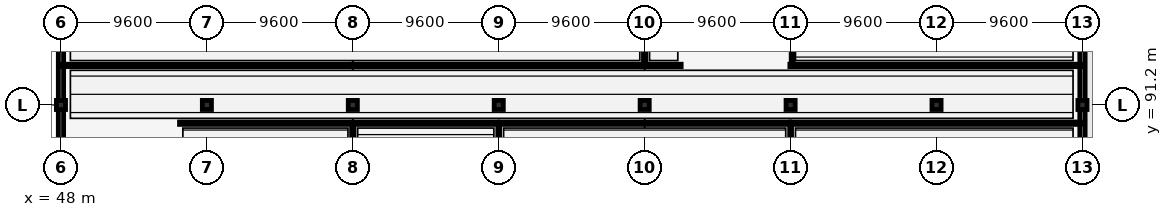
"""IFC4 building model, lengths in metres.
Left out: names, types, materials, properties, quantities, classifications, styles, units other than length and angle.
Written with IfcOpenShell. Run it as: python <this file> out.ifc"""

import sys

from ifc_helpers import new_model, si_unit, direction, frame, frame_2d, origin, origin_2d, place, context, subcontext, project, spatial, rectangle, extrude, element, fill, save


model = new_model("IFC4")
c1 = context("Model", 3, precision=1e-05, world=origin(), true_north=direction((0.0, 1.0)))
c2 = subcontext(c1, "Body", "Model", "MODEL_VIEW")
j1 = project(units=[si_unit("LENGTHUNIT", "METRE"), si_unit("PLANEANGLEUNIT", "RADIAN")], contexts=[c1])
p1 = place(None, origin())
s1 = spatial("IfcSite", under=j1, at=p1, CompositionType="ELEMENT")
p2 = place(p1, origin())
s2 = spatial("IfcBuilding", under=s1, at=p2, CompositionType="ELEMENT")
p3 = place(p2, origin())
s3 = spatial("IfcBuildingStorey", under=s2, at=p3, CompositionType="ELEMENT", Elevation=0.0)
for number, where, z_axis, x_axis in (
    (1, (48.0, 91.2, 0.0), (0.0, 0.0, 1.0), (1.0, 0.0, 0.0)),
    (2, (57.6, 91.2, 0.0), (0.0, 0.0, 1.0), (1.0, 0.0, 0.0)),
    (3, (67.2, 91.2, 0.0), (0.0, 0.0, 1.0), (1.0, 0.0, 0.0)),
    (4, (76.8, 91.2, 0.0), (0.0, 0.0, 1.0), (1.0, 0.0, 0.0)),
    (5, (86.4, 91.2, 0.0), (0.0, 0.0, 1.0), (1.0, 0.0, 0.0)),
    (6, (96.0, 91.2, 0.0), (0.0, 0.0, 1.0), (1.0, 0.0, 0.0)),
    (7, (105.6, 91.2, 0.0), (0.0, 0.0, 1.0), (1.0, 0.0, 0.0)),
    (8, (115.2, 91.2, 0.0), (0.0, 0.0, 1.0), (1.0, 0.0, 0.0)),
):
    element("IfcColumn", number, at=place(p3, frame(where, z_axis=z_axis, x_axis=x_axis)), inside=s3, PredefinedType="COLUMN", context=c2, shape_type="SweptSolid", body=[
        extrude(rectangle(XDim=0.6, YDim=0.6, at=origin_2d()), origin(), (0.0, 0.0, 1.0), 4.8),
    ])
p4 = place(p3, frame((48.0, 81.9, 0.0), z_axis=(0.0, 0.0, 1.0), x_axis=(0.0, 1.0, 0.0)))
e9 = element("IfcWall", 9, at=p4, inside=s3, PredefinedType="SOLIDWALL", context=c2, shape_type="SweptSolid", body=[
    extrude(rectangle(XDim=9.0, YDim=0.35, at=frame_2d((4.5, 0.0))), origin(), (0.0, 0.0, 1.0), 4.1),
])
p5 = place(p4, frame((2.8, 0.0, 1.15)))
e10 = element("IfcOpeningElement", 10, at=p5, cuts=e9, PredefinedType="OPENING", context=c2, shape_type="SweptSolid", body=[
    extrude(rectangle(XDim=1.38, YDim=1.51, at=frame_2d((0.69, 0.755))), frame((0.0, 0.185, 0.0), z_axis=(0.0, -1.0, 0.0), x_axis=(1.0, 0.0, 0.0)), (0.0, 0.0, 1.0), 0.37),
])
p6 = place(p3, frame((115.2, 81.9, 0.0), z_axis=(0.0, 0.0, 1.0), x_axis=(0.0, 1.0, 0.0)))
e11 = element("IfcWall", 11, at=p6, inside=s3, PredefinedType="SOLIDWALL", context=c2, shape_type="SweptSolid", body=[
    extrude(rectangle(XDim=9.0, YDim=0.35, at=frame_2d((4.5, 0.0))), origin(), (0.0, 0.0, 1.0), 4.1),
])
p7 = place(p6, frame((2.8, 0.0, 1.15)))
e12 = element("IfcOpeningElement", 12, at=p7, cuts=e11, PredefinedType="OPENING", context=c2, shape_type="SweptSolid", body=[
    extrude(rectangle(XDim=1.5, YDim=1.6, at=frame_2d((0.75, 0.8))), frame((0.0, 0.185, 0.0), z_axis=(0.0, -1.0, 0.0), x_axis=(1.0, 0.0, 0.0)), (0.0, 0.0, 1.0), 0.37),
])
p8 = place(p3, frame((48.0, 91.5, 0.0), z_axis=(0.0, 0.0, 1.0), x_axis=(0.0, 1.0, 0.0)))
e13 = element("IfcWall", 13, at=p8, inside=s3, PredefinedType="SOLIDWALL", context=c2, shape_type="SweptSolid", body=[
    extrude(rectangle(XDim=9.0, YDim=0.35, at=frame_2d((4.5, 0.0))), origin(), (0.0, 0.0, 1.0), 4.1),
])
p9 = place(p8, frame((4.3, 0.0, 0.0)))
e14 = element("IfcOpeningElement", 14, at=p9, cuts=e13, PredefinedType="OPENING", context=c2, shape_type="SweptSolid", body=[
    extrude(rectangle(XDim=1.76, YDim=2.37, at=frame_2d((0.88, 1.185))), frame((0.0, 0.185, 0.0), z_axis=(0.0, -1.0, 0.0), x_axis=(1.0, 0.0, 0.0)), (0.0, 0.0, 1.0), 0.37),
])
p10 = place(p3, frame((115.2, 91.5, 0.0), z_axis=(0.0, 0.0, 1.0), x_axis=(0.0, 1.0, 0.0)))
e15 = element("IfcWall", 15, at=p10, inside=s3, PredefinedType="SOLIDWALL", context=c2, shape_type="SweptSolid", body=[
    extrude(rectangle(XDim=9.0, YDim=0.35, at=frame_2d((4.5, 0.0))), origin(), (0.0, 0.0, 1.0), 4.1),
])
p11 = place(p10, frame((4.3, 0.0, 0.0)))
e16 = element("IfcOpeningElement", 16, at=p11, cuts=e15, PredefinedType="OPENING", context=c2, shape_type="SweptSolid", body=[
    extrude(rectangle(XDim=1.72, YDim=2.34, at=frame_2d((0.86, 1.17))), frame((0.0, 0.185, 0.0), z_axis=(0.0, -1.0, 0.0), x_axis=(1.0, 0.0, 0.0)), (0.0, 0.0, 1.0), 0.37),
])
p12 = place(p2, frame((0.0, 0.0, -4.2)))
s4 = spatial("IfcBuildingStorey", under=s2, at=p12, CompositionType="ELEMENT", Elevation=-4.2)
p13 = place(p12, frame((38.575, 89.0, 0.0), z_axis=(0.0, 0.0, 1.0), x_axis=(1.0, 0.0, 0.0)))
e17 = element("IfcWall", 17, at=p13, inside=s4, PredefinedType="SOLIDWALL", context=c2, shape_type="SweptSolid", body=[
    extrude(rectangle(XDim=9.25, YDim=0.4, at=frame_2d((4.625, 0.0))), origin(), (0.0, 0.0, 1.0), 9.0),
])
p14 = place(p3, frame((67.2, 81.4, 0.0), z_axis=(0.0, 0.0, 1.0), x_axis=(0.0, 1.0, 0.0)))
e18 = element("IfcWall", 18, at=p14, inside=s3, PredefinedType="PARTITIONING", context=c2, shape_type="SweptSolid", body=[
    extrude(rectangle(XDim=8.5, YDim=0.16, at=frame_2d((4.25, 0.0))), origin(), (0.0, 0.0, 1.0), 3.92),
])
p15 = place(p14, frame((3.675, 0.0, 0.0)))
e19 = element("IfcOpeningElement", 19, at=p15, cuts=e18, PredefinedType="OPENING", context=c2, shape_type="SweptSolid", body=[
    extrude(rectangle(XDim=1.15, YDim=2.2, at=frame_2d((0.575, 1.1))), frame((0.0, 0.09, 0.0), z_axis=(0.0, -1.0, 0.0), x_axis=(1.0, 0.0, 0.0)), (0.0, 0.0, 1.0), 0.18),
])
p16 = place(p3, frame((55.8, 90.0, 0.0), z_axis=(0.0, 0.0, 1.0), x_axis=(1.0, 0.0, 0.0)))
e20 = element("IfcWall", 20, at=p16, inside=s3, PredefinedType="PARTITIONING", context=c2, shape_type="SweptSolid", body=[
    extrude(rectangle(XDim=11.3, YDim=0.16, at=frame_2d((5.65, 0.0))), origin(), (0.0, 0.0, 1.0), 4.42),
])
p17 = place(p16, frame((4.75, 0.0, 0.0)))
e21 = element("IfcOpeningElement", 21, at=p17, cuts=e20, PredefinedType="OPENING", context=c2, shape_type="SweptSolid", body=[
    extrude(rectangle(XDim=1.8, YDim=2.15, at=frame_2d((0.9, 1.075))), frame((0.0, 0.09, 0.0), z_axis=(0.0, -1.0, 0.0), x_axis=(1.0, 0.0, 0.0)), (0.0, 0.0, 1.0), 0.18),
])
p18 = place(p3, frame((76.8, 81.4, 0.0), z_axis=(0.0, 0.0, 1.0), x_axis=(0.0, 1.0, 0.0)))
e22 = element("IfcWall", 22, at=p18, inside=s3, PredefinedType="PARTITIONING", context=c2, shape_type="SweptSolid", body=[
    extrude(rectangle(XDim=8.5, YDim=0.125, at=frame_2d((4.25, 0.0))), origin(), (0.0, 0.0, 1.0), 3.92),
])
p19 = place(p3, frame((67.3, 90.0, 0.0), z_axis=(0.0, 0.0, 1.0), x_axis=(1.0, 0.0, 0.0)))
e23 = element("IfcWall", 23, at=p19, inside=s3, PredefinedType="PARTITIONING", context=c2, shape_type="SweptSolid", body=[
    extrude(rectangle(XDim=9.4, YDim=0.16, at=frame_2d((4.7, 0.0))), origin(), (0.0, 0.0, 1.0), 4.42),
])
p20 = place(p19, frame((4.125, 0.0, 0.0)))
e24 = element("IfcOpeningElement", 24, at=p20, cuts=e23, PredefinedType="OPENING", context=c2, shape_type="SweptSolid", body=[
    extrude(rectangle(XDim=1.15, YDim=2.2, at=frame_2d((0.575, 1.1))), frame((0.0, 0.09, 0.0), z_axis=(0.0, -1.0, 0.0), x_axis=(1.0, 0.0, 0.0)), (0.0, 0.0, 1.0), 0.18),
])
p21 = place(p3, frame((96.0, 72.05, 0.0), z_axis=(0.0, 0.0, 1.0), x_axis=(0.0, 1.0, 0.0)))
e25 = element("IfcWall", 25, at=p21, inside=s3, PredefinedType="PARTITIONING", context=c2, shape_type="SweptSolid", body=[
    extrude(rectangle(XDim=17.85, YDim=0.125, at=frame_2d((8.925, 0.0))), origin(), (0.0, 0.0, 1.0), 3.92),
])
p22 = place(p3, frame((76.9, 90.0, 0.0), z_axis=(0.0, 0.0, 1.0), x_axis=(1.0, 0.0, 0.0)))
e26 = element("IfcWall", 26, at=p22, inside=s3, PredefinedType="PARTITIONING", context=c2, shape_type="SweptSolid", body=[
    extrude(rectangle(XDim=19.05, YDim=0.16, at=frame_2d((9.525, 0.0))), origin(), (0.0, 0.0, 1.0), 4.42),
])
p23 = place(p22, frame((6.373, 0.0, 0.0)))
e27 = element("IfcOpeningElement", 27, at=p23, cuts=e26, PredefinedType="OPENING", context=c2, shape_type="SweptSolid", body=[
    extrude(rectangle(XDim=1.15, YDim=2.2, at=frame_2d((0.575, 1.1))), frame((0.0, 0.09, 0.0), z_axis=(0.0, -1.0, 0.0), x_axis=(1.0, 0.0, 0.0)), (0.0, 0.0, 1.0), 0.18),
])
p24 = place(p3, frame((96.03, 90.0, 0.0), z_axis=(0.0, 0.0, 1.0), x_axis=(1.0, 0.0, 0.0)))
e28 = element("IfcWall", 28, at=p24, inside=s3, PredefinedType="PARTITIONING", context=c2, shape_type="SweptSolid", body=[
    extrude(rectangle(XDim=19.12, YDim=0.16, at=frame_2d((9.56, 0.0))), origin(), (0.0, 0.0, 1.0), 4.42),
])
p25 = place(p24, frame((11.572, 0.0, 0.0)))
e29 = element("IfcOpeningElement", 29, at=p25, cuts=e28, PredefinedType="OPENING", context=c2, shape_type="SweptSolid", body=[
    extrude(rectangle(XDim=1.15, YDim=2.2, at=frame_2d((0.575, 1.1))), frame((0.0, 0.09, 0.0), z_axis=(0.0, -1.0, 0.0), x_axis=(1.0, 0.0, 0.0)), (0.0, 0.0, 1.0), 0.18),
])
p26 = place(p3, frame((86.5, 93.8, 0.0), z_axis=(0.0, 0.0, 1.0), x_axis=(1.0, 0.0, 0.0)))
e30 = element("IfcWall", 30, at=p26, inside=s3, PredefinedType="PARTITIONING", context=c2, shape_type="SweptSolid", body=[
    extrude(rectangle(XDim=2.3, YDim=0.16, at=frame_2d((1.15, 0.0))), origin(), (0.0, 0.0, 1.0), 4.42),
])
p27 = place(p26, frame((0.25, 0.0, 0.0)))
e31 = element("IfcOpeningElement", 31, at=p27, cuts=e30, PredefinedType="OPENING", context=c2, shape_type="SweptSolid", body=[
    extrude(rectangle(XDim=1.8, YDim=2.15, at=frame_2d((0.9, 1.075))), frame((0.0, 0.09, 0.0), z_axis=(0.0, -1.0, 0.0), x_axis=(1.0, 0.0, 0.0)), (0.0, 0.0, 1.0), 0.18),
])
p28 = place(p3, frame((48.05, 93.8, 0.0), z_axis=(0.0, 0.0, 1.0), x_axis=(1.0, 0.0, 0.0)))
e32 = element("IfcWall", 32, at=p28, inside=s3, PredefinedType="PARTITIONING", context=c2, shape_type="SweptSolid", body=[
    extrude(rectangle(XDim=38.25, YDim=0.16, at=frame_2d((19.125, 0.0))), origin(), (0.0, 0.0, 1.0), 4.42),
])
p29 = place(p28, frame((18.615, 0.0, 0.0)))
e33 = element("IfcOpeningElement", 33, at=p29, cuts=e32, PredefinedType="OPENING", context=c2, shape_type="SweptSolid", body=[
    extrude(rectangle(XDim=1.02, YDim=2.16, at=frame_2d((0.51, 1.08))), frame((0.0, 0.09, 0.0), z_axis=(0.0, -1.0, 0.0), x_axis=(1.0, 0.0, 0.0)), (0.0, 0.0, 1.0), 0.18),
])
p30 = place(p3, frame((95.95, 93.8, 0.0), z_axis=(0.0, 0.0, 1.0), x_axis=(1.0, 0.0, 0.0)))
e34 = element("IfcWall", 34, at=p30, inside=s3, PredefinedType="PARTITIONING", context=c2, shape_type="SweptSolid", body=[
    extrude(rectangle(XDim=19.2, YDim=0.16, at=frame_2d((9.6, 0.0))), origin(), (0.0, 0.0, 1.0), 4.42),
])
p31 = place(p30, frame((9.08, 0.0, 0.0)))
e35 = element("IfcOpeningElement", 35, at=p31, cuts=e34, PredefinedType="OPENING", context=c2, shape_type="SweptSolid", body=[
    extrude(rectangle(XDim=1.04, YDim=2.18, at=frame_2d((0.52, 1.09))), frame((0.0, 0.09, 0.0), z_axis=(0.0, -1.0, 0.0), x_axis=(1.0, 0.0, 0.0)), (0.0, 0.0, 1.0), 0.18),
])
p32 = place(p3, frame((86.4, 93.9, 0.0), z_axis=(0.0, 0.0, 1.0), x_axis=(0.0, 1.0, 0.0)))
e36 = element("IfcWall", 36, at=p32, inside=s3, PredefinedType="PARTITIONING", context=c2, shape_type="SweptSolid", body=[
    extrude(rectangle(XDim=24.05, YDim=0.16, at=frame_2d((12.025, 0.0))), origin(), (0.0, 0.0, 1.0), 3.92),
])
p33 = place(p32, frame((11.515, 0.0, 0.0)))
e37 = element("IfcOpeningElement", 37, at=p33, cuts=e36, PredefinedType="OPENING", context=c2, shape_type="SweptSolid", body=[
    extrude(rectangle(XDim=1.02, YDim=2.16, at=frame_2d((0.51, 1.08))), frame((0.0, 0.09, 0.0), z_axis=(0.0, -1.0, 0.0), x_axis=(1.0, 0.0, 0.0)), (0.0, 0.0, 1.0), 0.18),
])
p34 = place(p3, frame((96.1, 94.04, 0.0), z_axis=(0.0, 0.0, 1.0), x_axis=(0.0, 1.0, 0.0)))
e38 = element("IfcWall", 38, at=p34, inside=s3, PredefinedType="PARTITIONING", context=c2, shape_type="SweptSolid", body=[
    extrude(rectangle(XDim=12.62, YDim=0.125, at=frame_2d((6.31, 0.0))), origin(), (0.0, 0.0, 1.0), 3.92),
])
p35 = place(p17, origin())
e39 = element("IfcDoor", 39, at=p35, inside=s3, OperationType="DOUBLE_DOOR_SINGLE_SWING", PredefinedType="DOOR", context=c2, shape_type="SweptSolid", body=[
    extrude(rectangle(XDim=1.8, YDim=2.15, at=frame_2d((0.9, 1.075))), frame((0.0, 0.025, 0.0), z_axis=(0.0, -1.0, 0.0), x_axis=(1.0, 0.0, 0.0)), (0.0, 0.0, 1.0), 0.05),
])
fill(e21, e39)
p36 = place(p20, origin())
e40 = element("IfcDoor", 40, at=p36, inside=s3, OperationType="SINGLE_SWING_LEFT", PredefinedType="DOOR", context=c2, shape_type="SweptSolid", body=[
    extrude(rectangle(XDim=1.15, YDim=2.2, at=frame_2d((0.575, 1.1))), frame((0.0, 0.025, 0.0), z_axis=(0.0, -1.0, 0.0), x_axis=(1.0, 0.0, 0.0)), (0.0, 0.0, 1.0), 0.05),
])
fill(e24, e40)
p37 = place(p23, origin())
e41 = element("IfcDoor", 41, at=p37, inside=s3, OperationType="SINGLE_SWING_RIGHT", PredefinedType="DOOR", context=c2, shape_type="SweptSolid", body=[
    extrude(rectangle(XDim=1.15, YDim=2.2, at=frame_2d((0.575, 1.1))), frame((0.0, 0.025, 0.0), z_axis=(0.0, -1.0, 0.0), x_axis=(1.0, 0.0, 0.0)), (0.0, 0.0, 1.0), 0.05),
])
fill(e27, e41)
p38 = place(p25, origin())
e42 = element("IfcDoor", 42, at=p38, inside=s3, OperationType="SINGLE_SWING_LEFT", PredefinedType="DOOR", context=c2, shape_type="SweptSolid", body=[
    extrude(rectangle(XDim=1.15, YDim=2.2, at=frame_2d((0.575, 1.1))), frame((0.0, 0.025, 0.0), z_axis=(0.0, -1.0, 0.0), x_axis=(1.0, 0.0, 0.0)), (0.0, 0.0, 1.0), 0.05),
])
fill(e29, e42)
p39 = place(p27, origin())
e43 = element("IfcDoor", 43, at=p39, inside=s3, OperationType="DOUBLE_DOOR_SINGLE_SWING", PredefinedType="DOOR", context=c2, shape_type="SweptSolid", body=[
    extrude(rectangle(XDim=1.8, YDim=2.15, at=frame_2d((0.9, 1.075))), frame((0.0, 0.025, 0.0), z_axis=(0.0, -1.0, 0.0), x_axis=(1.0, 0.0, 0.0)), (0.0, 0.0, 1.0), 0.05),
])
fill(e31, e43)
p40 = place(p29, origin())
e44 = element("IfcDoor", 44, at=p40, inside=s3, OperationType="SINGLE_SWING_LEFT", PredefinedType="DOOR", context=c2, shape_type="SweptSolid", body=[
    extrude(rectangle(XDim=1.02, YDim=2.16, at=frame_2d((0.51, 1.08))), frame((0.0, 0.025, 0.0), z_axis=(0.0, -1.0, 0.0), x_axis=(1.0, 0.0, 0.0)), (0.0, 0.0, 1.0), 0.05),
])
fill(e33, e44)
p41 = place(p31, origin())
e45 = element("IfcDoor", 45, at=p41, inside=s3, OperationType="SINGLE_SWING_RIGHT", PredefinedType="DOOR", context=c2, shape_type="SweptSolid", body=[
    extrude(rectangle(XDim=1.04, YDim=2.18, at=frame_2d((0.52, 1.09))), frame((0.0, 0.025, 0.0), z_axis=(0.0, -1.0, 0.0), x_axis=(1.0, 0.0, 0.0)), (0.0, 0.0, 1.0), 0.05),
])
fill(e35, e45)
save(model, sys.argv[1])
